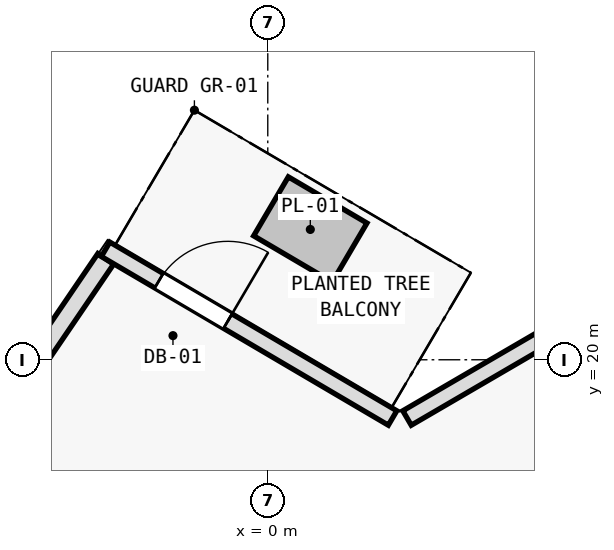
"""IFC4 building model, lengths in metres.
Left out: names, types, materials, properties, quantities, classifications, styles, units other than length and angle.
Written with IfcOpenShell. Run it as: python <this file> out.ifc"""

import sys

from ifc_helpers import new_model, si_unit, direction, frame, frame_2d, origin, place, context, subcontext, project, spatial, rectangle, extrude, element, fill, save


model = new_model("IFC4")
c1 = context("Model", 3, precision=1e-05, world=origin(), true_north=direction((0.0, 1.0)))
c2 = subcontext(c1, "Body", "Model", "MODEL_VIEW")
j1 = project(units=[si_unit("LENGTHUNIT", "METRE"), si_unit("PLANEANGLEUNIT", "RADIAN")], contexts=[c1])
p1 = place(None, origin())
s1 = spatial("IfcSite", under=j1, at=p1, CompositionType="ELEMENT")
p2 = place(p1, origin())
s2 = spatial("IfcBuilding", under=s1, at=p2, CompositionType="ELEMENT")
p3 = place(p2, frame((0.0, 0.0, 268.8)))
s3 = spatial("IfcBuildingStorey", under=s2, at=p3, CompositionType="ELEMENT", Elevation=268.8)
p4 = place(p3, frame((-7.817, 12.971, 0.0), z_axis=(0.0, 0.0, 1.0), x_axis=(0.562474530687, 0.826814611826, 0.0)))
e1 = element("IfcWall", 1, at=p4, inside=s3, PredefinedType="SOLIDWALL", context=c2, shape_type="SweptSolid", body=[
    extrude(rectangle(XDim=10.107, YDim=0.25, at=frame_2d((5.053, 0.0))), origin(), (0.0, 0.0, 1.0), 3.35),
])
p5 = place(p4, frame((4.303, 0.0, 0.62)))
e2 = element("IfcOpeningElement", 2, at=p5, cuts=e1, PredefinedType="OPENING", context=c2, shape_type="SweptSolid", body=[
    extrude(rectangle(XDim=1.5, YDim=2.0, at=frame_2d((0.75, 1.0))), frame((0.0, 0.135, 0.0), z_axis=(0.0, -1.0, 0.0), x_axis=(1.0, 0.0, 0.0)), (0.0, 0.0, 1.0), 0.27),
])
p6 = place(p3, frame((1.832, 19.234, 0.0), z_axis=(0.0, 0.0, 1.0), x_axis=(0.86397765749, 0.503530145432, 0.0)))
e3 = element("IfcWall", 3, at=p6, inside=s3, PredefinedType="SOLIDWALL", context=c2, shape_type="SweptSolid", body=[
    extrude(rectangle(XDim=3.964, YDim=0.22, at=frame_2d((1.982, 0.0))), origin(), (0.0, 0.0, 1.0), 3.35),
])
p7 = place(p3, frame((-2.134, 21.453, 0.0), z_axis=(0.0, 0.0, 1.0), x_axis=(0.862106131527, -0.506727755292, 0.0)))
e4 = element("IfcWall", 4, at=p7, inside=s3, PredefinedType="SOLIDWALL", context=c2, shape_type="SweptSolid", body=[
    extrude(rectangle(XDim=4.38, YDim=0.22, at=frame_2d((2.19, 0.0))), origin(), (0.0, 0.0, 1.0), 3.35),
])
p8 = place(p7, frame((0.815, 0.0, 0.0)))
e5 = element("IfcOpeningElement", 5, at=p8, cuts=e4, PredefinedType="OPENING", context=c2, shape_type="SweptSolid", body=[
    extrude(rectangle(XDim=1.05, YDim=2.15, at=frame_2d((0.525, 1.075))), frame((0.0, 0.12, 0.0), z_axis=(0.0, -1.0, 0.0), x_axis=(1.0, 0.0, 0.0)), (0.0, 0.0, 1.0), 0.24),
])
p9 = place(p8, origin())
e6 = element("IfcDoor", 6, at=p9, inside=s3, OperationType="SINGLE_SWING_RIGHT", PredefinedType="DOOR", context=c2, shape_type="SweptSolid", body=[
    extrude(rectangle(XDim=1.05, YDim=2.15, at=frame_2d((0.525, 1.075))), frame((0.0, 0.025, 0.0), z_axis=(0.0, -1.0, 0.0), x_axis=(1.0, 0.0, 0.0)), (0.0, 0.0, 1.0), 0.05),
])
fill(e5, e6)
save(model, sys.argv[1])
